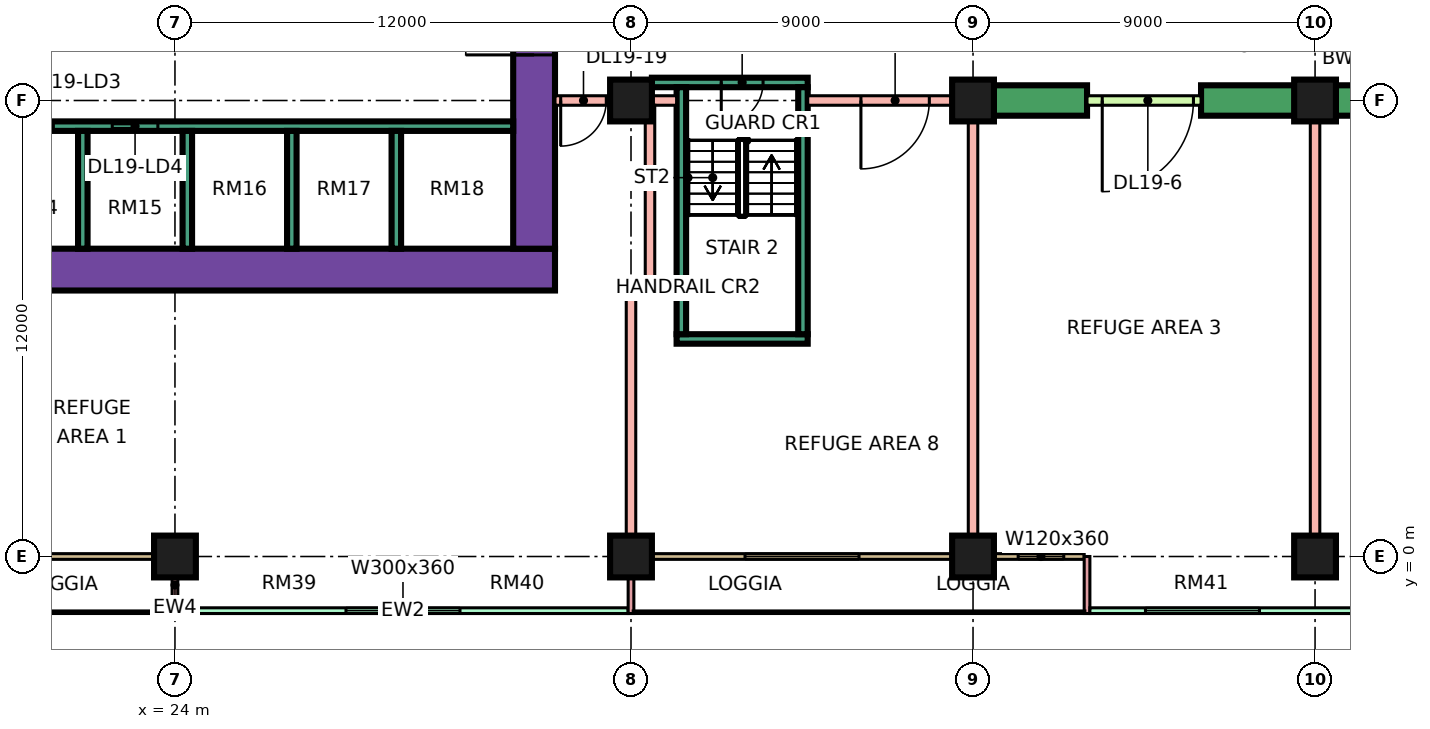
"""IFC4 building model, lengths in metres.
Left out: names, types, materials, properties, quantities, classifications, styles, units other than length and angle.
Written with IfcOpenShell. Run it as: python <this file> out.ifc"""

import sys

from ifc_helpers import new_model, si_unit, direction, frame, frame_2d, origin, origin_2d, place, context, subcontext, project, spatial, rectangle, extrude, element, fill, save


model = new_model("IFC4")
c1 = context("Model", 3, precision=1e-05, world=origin(), true_north=direction((0.0, 1.0)))
c2 = subcontext(c1, "Body", "Model", "MODEL_VIEW")
j1 = project(units=[si_unit("LENGTHUNIT", "METRE"), si_unit("PLANEANGLEUNIT", "RADIAN")], contexts=[c1])
p1 = place(None, origin())
s1 = spatial("IfcSite", under=j1, at=p1, CompositionType="ELEMENT")
p2 = place(p1, origin())
s2 = spatial("IfcBuilding", under=s1, at=p2, CompositionType="ELEMENT")
p3 = place(p2, frame((0.0, 0.0, 86.4)))
s3 = spatial("IfcBuildingStorey", under=s2, at=p3, CompositionType="ELEMENT", Elevation=86.4)
for number, where, z_axis, x_axis in (
    (1, (24.0, 0.0, 0.0), (0.0, 0.0, 1.0), (1.0, 0.0, 0.0)),
    (2, (36.0, 0.0, 0.0), (0.0, 0.0, 1.0), (1.0, 0.0, 0.0)),
    (3, (36.0, 12.0, 0.0), (0.0, 0.0, 1.0), (1.0, 0.0, 0.0)),
    (4, (45.0, 0.0, 0.0), (0.0, 0.0, 1.0), (1.0, 0.0, 0.0)),
):
    element("IfcColumn", number, at=place(p3, frame(where, z_axis=z_axis, x_axis=x_axis)), inside=s3, PredefinedType="COLUMN", context=c2, shape_type="SweptSolid", body=[
        extrude(rectangle(XDim=1.1, YDim=1.1, at=origin_2d()), origin(), (0.0, 0.0, 1.0), 5.5),
    ])
p4 = place(p3, frame((45.0, 12.0, 0.0), z_axis=(0.0, 0.0, 1.0), x_axis=(1.0, 0.0, 0.0)))
e5 = element("IfcColumn", 5, at=p4, inside=s3, PredefinedType="COLUMN", context=c2, shape_type="SweptSolid", body=[
    extrude(rectangle(XDim=1.1, YDim=1.1, at=origin_2d()), origin(), (0.0, 0.0, 1.0), 5.5),
])
p5 = place(p3, frame((54.0, 0.0, 0.0), z_axis=(0.0, 0.0, 1.0), x_axis=(1.0, 0.0, 0.0)))
e6 = element("IfcColumn", 6, at=p5, inside=s3, PredefinedType="COLUMN", context=c2, shape_type="SweptSolid", body=[
    extrude(rectangle(XDim=1.1, YDim=1.1, at=origin_2d()), origin(), (0.0, 0.0, 1.0), 5.5),
])
p6 = place(p3, frame((54.0, 12.0, 0.0), z_axis=(0.0, 0.0, 1.0), x_axis=(1.0, 0.0, 0.0)))
e7 = element("IfcColumn", 7, at=p6, inside=s3, PredefinedType="COLUMN", context=c2, shape_type="SweptSolid", body=[
    extrude(rectangle(XDim=1.1, YDim=1.1, at=origin_2d()), origin(), (0.0, 0.0, 1.0), 5.5),
])
p7 = place(p3, frame((9.0, 7.55, 0.0), z_axis=(0.0, 0.0, 1.0), x_axis=(1.0, 0.0, 0.0)))
e8 = element("IfcWall", 8, at=p7, inside=s3, PredefinedType="SHEAR", context=c2, shape_type="SweptSolid", body=[
    extrude(rectangle(XDim=25.0, YDim=1.1, at=frame_2d((12.5, 0.0))), origin(), (0.0, 0.0, 1.0), 5.5),
])
p8 = place(p3, frame((33.45, 8.1, 0.0), z_axis=(0.0, 0.0, 1.0), x_axis=(0.0, 1.0, 0.0)))
e9 = element("IfcWall", 9, at=p8, inside=s3, PredefinedType="SHEAR", context=c2, shape_type="SweptSolid", body=[
    extrude(rectangle(XDim=10.8, YDim=1.1, at=frame_2d((5.4, 0.0))), origin(), (0.0, 0.0, 1.0), 5.5),
])
p9 = place(p8, frame((5.1, 0.0, 0.0)))
e10 = element("IfcOpeningElement", 10, at=p9, cuts=e9, PredefinedType="OPENING", context=c2, shape_type="SweptSolid", body=[
    extrude(rectangle(XDim=1.8, YDim=2.4, at=frame_2d((0.9, 1.2))), frame((0.0, 0.56, 0.0), z_axis=(0.0, -1.0, 0.0), x_axis=(1.0, 0.0, 0.0)), (0.0, 0.0, 1.0), 1.12),
])
p10 = place(p3, frame((13.45, 11.325, 0.0), z_axis=(0.0, 0.0, 1.0), x_axis=(1.0, 0.0, 0.0)))
e11 = element("IfcWall", 11, at=p10, inside=s3, PredefinedType="SHEAR", context=c2, shape_type="SweptSolid", body=[
    extrude(rectangle(XDim=19.45, YDim=0.25, at=frame_2d((9.725, 0.0))), origin(), (0.0, 0.0, 1.0), 5.5),
])
p11 = place(p10, frame((0.65, 0.0, 0.0)))
e12 = element("IfcOpeningElement", 12, at=p11, cuts=e11, PredefinedType="OPENING", context=c2, shape_type="SweptSolid", body=[
    extrude(rectangle(XDim=1.2, YDim=2.2, at=frame_2d((0.6, 1.1))), frame((0.0, 0.135, 0.0), z_axis=(0.0, -1.0, 0.0), x_axis=(1.0, 0.0, 0.0)), (0.0, 0.0, 1.0), 0.27),
])
p12 = place(p10, frame((3.4, 0.0, 0.0)))
e13 = element("IfcOpeningElement", 13, at=p12, cuts=e11, PredefinedType="OPENING", context=c2, shape_type="SweptSolid", body=[
    extrude(rectangle(XDim=1.2, YDim=2.2, at=frame_2d((0.6, 1.1))), frame((0.0, 0.135, 0.0), z_axis=(0.0, -1.0, 0.0), x_axis=(1.0, 0.0, 0.0)), (0.0, 0.0, 1.0), 0.27),
])
p13 = place(p10, frame((6.15, 0.0, 0.0)))
e14 = element("IfcOpeningElement", 14, at=p13, cuts=e11, PredefinedType="OPENING", context=c2, shape_type="SweptSolid", body=[
    extrude(rectangle(XDim=1.2, YDim=2.2, at=frame_2d((0.6, 1.1))), frame((0.0, 0.135, 0.0), z_axis=(0.0, -1.0, 0.0), x_axis=(1.0, 0.0, 0.0)), (0.0, 0.0, 1.0), 0.27),
])
p14 = place(p10, frame((8.9, 0.0, 0.0)))
e15 = element("IfcOpeningElement", 15, at=p14, cuts=e11, PredefinedType="OPENING", context=c2, shape_type="SweptSolid", body=[
    extrude(rectangle(XDim=1.2, YDim=2.2, at=frame_2d((0.6, 1.1))), frame((0.0, 0.135, 0.0), z_axis=(0.0, -1.0, 0.0), x_axis=(1.0, 0.0, 0.0)), (0.0, 0.0, 1.0), 0.27),
])
for number, where, z_axis, x_axis in (
    (16, (21.575, 8.1, 0.0), (0.0, 0.0, 1.0), (0.0, 1.0, 0.0)),
    (17, (24.325, 8.1, 0.0), (0.0, 0.0, 1.0), (0.0, 1.0, 0.0)),
    (18, (27.075, 8.1, 0.0), (0.0, 0.0, 1.0), (0.0, 1.0, 0.0)),
    (19, (29.825, 8.1, 0.0), (0.0, 0.0, 1.0), (0.0, 1.0, 0.0)),
):
    element("IfcWall", number, at=place(p3, frame(where, z_axis=z_axis, x_axis=x_axis)), inside=s3, PredefinedType="SHEAR", context=c2, shape_type="SweptSolid", body=[
        extrude(rectangle(XDim=3.1, YDim=0.25, at=frame_2d((1.55, 0.0))), origin(), (0.0, 0.0, 1.0), 5.5),
    ])
p15 = place(p3, frame((37.2, 5.725, 0.0), z_axis=(0.0, 0.0, 1.0), x_axis=(1.0, 0.0, 0.0)))
e20 = element("IfcWall", 20, at=p15, inside=s3, PredefinedType="SHEAR", context=c2, shape_type="SweptSolid", body=[
    extrude(rectangle(XDim=3.45, YDim=0.25, at=frame_2d((1.725, 0.0))), origin(), (0.0, 0.0, 1.0), 5.5),
])
p16 = place(p3, frame((36.55, 12.475, 0.0), z_axis=(0.0, 0.0, 1.0), x_axis=(1.0, 0.0, 0.0)))
e21 = element("IfcWall", 21, at=p16, inside=s3, PredefinedType="SHEAR", context=c2, shape_type="SweptSolid", body=[
    extrude(rectangle(XDim=4.1, YDim=0.25, at=frame_2d((2.05, 0.0))), origin(), (0.0, 0.0, 1.0), 5.5),
])
p17 = place(p16, frame((1.825, 0.0, 0.0)))
e22 = element("IfcOpeningElement", 22, at=p17, cuts=e21, PredefinedType="OPENING", context=c2, shape_type="SweptSolid", body=[
    extrude(rectangle(XDim=1.1, YDim=2.2, at=frame_2d((0.55, 1.1))), frame((0.0, 0.135, 0.0), z_axis=(0.0, -1.0, 0.0), x_axis=(1.0, 0.0, 0.0)), (0.0, 0.0, 1.0), 0.27),
])
for number, where, z_axis, x_axis in (
    (23, (37.325, 5.85, 0.0), (0.0, 0.0, 1.0), (0.0, 1.0, 0.0)),
    (24, (40.525, 5.85, 0.0), (0.0, 0.0, 1.0), (0.0, 1.0, 0.0)),
):
    element("IfcWall", number, at=place(p3, frame(where, z_axis=z_axis, x_axis=x_axis)), inside=s3, PredefinedType="SHEAR", context=c2, shape_type="SweptSolid", body=[
        extrude(rectangle(XDim=6.5, YDim=0.25, at=frame_2d((3.25, 0.0))), origin(), (0.0, 0.0, 1.0), 5.5),
    ])
e25 = element("IfcWall", 25, at=p4, inside=s3, PredefinedType="SHEAR", context=c2, shape_type="SweptSolid", body=[
    extrude(rectangle(XDim=3.0, YDim=0.8, at=frame_2d((1.5, 0.0))), origin(), (0.0, 0.0, 1.0), 5.1),
])
p18 = place(p3, frame((51.0, 12.0, 0.0), z_axis=(0.0, 0.0, 1.0), x_axis=(1.0, 0.0, 0.0)))
e26 = element("IfcWall", 26, at=p18, inside=s3, PredefinedType="SHEAR", context=c2, shape_type="SweptSolid", body=[
    extrude(rectangle(XDim=3.0, YDim=0.8, at=frame_2d((1.5, 0.0))), origin(), (0.0, 0.0, 1.0), 5.1),
])
e27 = element("IfcWall", 27, at=p6, inside=s3, PredefinedType="SHEAR", context=c2, shape_type="SweptSolid", body=[
    extrude(rectangle(XDim=3.0, YDim=0.8, at=frame_2d((1.5, 0.0))), origin(), (0.0, 0.0, 1.0), 5.1),
])
p19 = place(p3, frame((12.575, 0.0, 0.0), z_axis=(0.0, 0.0, 1.0), x_axis=(1.0, 0.0, 0.0)))
e28 = element("IfcWall", 28, at=p19, inside=s3, PredefinedType="SOLIDWALL", context=c2, shape_type="SweptSolid", body=[
    extrude(rectangle(XDim=11.35, YDim=0.15, at=frame_2d((5.675, 0.0))), origin(), (0.0, 0.0, 1.0), 5.1),
])
p20 = place(p19, frame((3.887, 0.0, 0.45)))
e29 = element("IfcOpeningElement", 29, at=p20, cuts=e28, PredefinedType="OPENING", context=c2, shape_type="SweptSolid", body=[
    extrude(rectangle(XDim=3.0, YDim=3.6, at=frame_2d((1.5, 1.8))), frame((0.0, 0.085, 0.0), z_axis=(0.0, -1.0, 0.0), x_axis=(1.0, 0.0, 0.0)), (0.0, 0.0, 1.0), 0.17),
])
p21 = place(p3, frame((24.0, -1.5, 0.0), z_axis=(0.0, 0.0, 1.0), x_axis=(0.0, 1.0, 0.0)))
e30 = element("IfcWall", 30, at=p21, inside=s3, PredefinedType="SOLIDWALL", context=c2, shape_type="SweptSolid", body=[
    extrude(rectangle(XDim=1.5, YDim=0.15, at=frame_2d((0.75, 0.0))), origin(), (0.0, 0.0, 1.0), 5.1),
])
p22 = place(p3, frame((24.075, -1.425, 0.0), z_axis=(0.0, 0.0, 1.0), x_axis=(1.0, 0.0, 0.0)))
e31 = element("IfcWall", 31, at=p22, inside=s3, PredefinedType="SOLIDWALL", context=c2, shape_type="SweptSolid", body=[
    extrude(rectangle(XDim=11.85, YDim=0.15, at=frame_2d((5.925, 0.0))), origin(), (0.0, 0.0, 1.0), 5.1),
])
p23 = place(p22, frame((4.425, 0.0, 0.45)))
e32 = element("IfcOpeningElement", 32, at=p23, cuts=e31, PredefinedType="OPENING", context=c2, shape_type="SweptSolid", body=[
    extrude(rectangle(XDim=3.0, YDim=3.6, at=frame_2d((1.5, 1.8))), frame((0.0, 0.085, 0.0), z_axis=(0.0, -1.0, 0.0), x_axis=(1.0, 0.0, 0.0)), (0.0, 0.0, 1.0), 0.17),
])
p24 = place(p3, frame((36.075, 0.0, 0.0), z_axis=(0.0, 0.0, 1.0), x_axis=(1.0, 0.0, 0.0)))
e33 = element("IfcWall", 33, at=p24, inside=s3, PredefinedType="SOLIDWALL", context=c2, shape_type="SweptSolid", body=[
    extrude(rectangle(XDim=11.85, YDim=0.15, at=frame_2d((5.925, 0.0))), origin(), (0.0, 0.0, 1.0), 5.1),
])
p25 = place(p24, frame((2.925, 0.0, 0.45)))
e34 = element("IfcOpeningElement", 34, at=p25, cuts=e33, PredefinedType="OPENING", context=c2, shape_type="SweptSolid", body=[
    extrude(rectangle(XDim=3.0, YDim=3.6, at=frame_2d((1.5, 1.8))), frame((0.0, 0.085, 0.0), z_axis=(0.0, -1.0, 0.0), x_axis=(1.0, 0.0, 0.0)), (0.0, 0.0, 1.0), 0.17),
])
p26 = place(p24, frame((10.113, 0.0, 0.45)))
e35 = element("IfcOpeningElement", 35, at=p26, cuts=e33, PredefinedType="OPENING", context=c2, shape_type="SweptSolid", body=[
    extrude(rectangle(XDim=1.2, YDim=3.6, at=frame_2d((0.6, 1.8))), frame((0.0, 0.085, 0.0), z_axis=(0.0, -1.0, 0.0), x_axis=(1.0, 0.0, 0.0)), (0.0, 0.0, 1.0), 0.17),
])
for number, where, z_axis, x_axis in (
    (36, (36.0, -1.5, 0.0), (0.0, 0.0, 1.0), (0.0, 1.0, 0.0)),
    (37, (48.0, -1.5, 0.0), (0.0, 0.0, 1.0), (0.0, 1.0, 0.0)),
):
    element("IfcWall", number, at=place(p3, frame(where, z_axis=z_axis, x_axis=x_axis)), inside=s3, PredefinedType="SOLIDWALL", context=c2, shape_type="SweptSolid", body=[
        extrude(rectangle(XDim=1.5, YDim=0.15, at=frame_2d((0.75, 0.0))), origin(), (0.0, 0.0, 1.0), 5.1),
    ])
p27 = place(p3, frame((48.075, -1.425, 0.0), z_axis=(0.0, 0.0, 1.0), x_axis=(1.0, 0.0, 0.0)))
e38 = element("IfcWall", 38, at=p27, inside=s3, PredefinedType="SOLIDWALL", context=c2, shape_type="SweptSolid", body=[
    extrude(rectangle(XDim=11.85, YDim=0.15, at=frame_2d((5.925, 0.0))), origin(), (0.0, 0.0, 1.0), 5.1),
])
p28 = place(p27, frame((1.462, 0.0, 0.45)))
e39 = element("IfcOpeningElement", 39, at=p28, cuts=e38, PredefinedType="OPENING", context=c2, shape_type="SweptSolid", body=[
    extrude(rectangle(XDim=3.0, YDim=3.6, at=frame_2d((1.5, 1.8))), frame((0.0, 0.085, 0.0), z_axis=(0.0, -1.0, 0.0), x_axis=(1.0, 0.0, 0.0)), (0.0, 0.0, 1.0), 0.17),
])
p29 = place(p27, frame((7.387, 0.0, 0.45)))
e40 = element("IfcOpeningElement", 40, at=p29, cuts=e38, PredefinedType="OPENING", context=c2, shape_type="SweptSolid", body=[
    extrude(rectangle(XDim=3.0, YDim=3.6, at=frame_2d((1.5, 1.8))), frame((0.0, 0.085, 0.0), z_axis=(0.0, -1.0, 0.0), x_axis=(1.0, 0.0, 0.0)), (0.0, 0.0, 1.0), 0.17),
])
p30 = place(p3, frame((34.0, 12.0, 0.0), z_axis=(0.0, 0.0, 1.0), x_axis=(1.0, 0.0, 0.0)))
e41 = element("IfcWall", 41, at=p30, inside=s3, PredefinedType="PARTITIONING", context=c2, shape_type="SweptSolid", body=[
    extrude(rectangle(XDim=3.2, YDim=0.25, at=frame_2d((1.6, 0.0))), origin(), (0.0, 0.0, 1.0), 5.1),
])
p31 = place(p30, frame((0.15, 0.0, 0.0)))
e42 = element("IfcOpeningElement", 42, at=p31, cuts=e41, PredefinedType="OPENING", context=c2, shape_type="SweptSolid", body=[
    extrude(rectangle(XDim=1.2, YDim=2.1, at=frame_2d((0.6, 1.05))), frame((0.0, 0.135, 0.0), z_axis=(0.0, -1.0, 0.0), x_axis=(1.0, 0.0, 0.0)), (0.0, 0.0, 1.0), 0.27),
])
p32 = place(p3, frame((36.0, 0.0, 0.0), z_axis=(0.0, 0.0, 1.0), x_axis=(0.0, 1.0, 0.0)))
e43 = element("IfcWall", 43, at=p32, inside=s3, PredefinedType="PARTITIONING", context=c2, shape_type="SweptSolid", body=[
    extrude(rectangle(XDim=7.125, YDim=0.25, at=frame_2d((3.562, 0.0))), origin(), (0.0, 0.0, 1.0), 5.1),
])
p33 = place(p3, frame((36.125, 7.0, 0.0), z_axis=(0.0, 0.0, 1.0), x_axis=(1.0, 0.0, 0.0)))
e44 = element("IfcWall", 44, at=p33, inside=s3, PredefinedType="PARTITIONING", context=c2, shape_type="SweptSolid", body=[
    extrude(rectangle(XDim=0.25, YDim=0.25, at=frame_2d((0.125, 0.0))), origin(), (0.0, 0.0, 1.0), 5.1),
])
p34 = place(p3, frame((36.5, 6.875, 0.0), z_axis=(0.0, 0.0, 1.0), x_axis=(0.0, 1.0, 0.0)))
e45 = element("IfcWall", 45, at=p34, inside=s3, PredefinedType="PARTITIONING", context=c2, shape_type="SweptSolid", body=[
    extrude(rectangle(XDim=5.0, YDim=0.25, at=frame_2d((2.5, 0.0))), origin(), (0.0, 0.0, 1.0), 5.1),
])
p35 = place(p3, frame((40.65, 12.0, 0.0), z_axis=(0.0, 0.0, 1.0), x_axis=(1.0, 0.0, 0.0)))
e46 = element("IfcWall", 46, at=p35, inside=s3, PredefinedType="PARTITIONING", context=c2, shape_type="SweptSolid", body=[
    extrude(rectangle(XDim=4.225, YDim=0.25, at=frame_2d((2.113, 0.0))), origin(), (0.0, 0.0, 1.0), 5.1),
])
p36 = place(p35, frame((1.4, 0.0, 0.0)))
e47 = element("IfcOpeningElement", 47, at=p36, cuts=e46, PredefinedType="OPENING", context=c2, shape_type="SweptSolid", body=[
    extrude(rectangle(XDim=1.8, YDim=2.1, at=frame_2d((0.9, 1.05))), frame((0.0, 0.135, 0.0), z_axis=(0.0, -1.0, 0.0), x_axis=(1.0, 0.0, 0.0)), (0.0, 0.0, 1.0), 0.27),
])
p37 = place(p3, frame((45.0, 0.074, 0.0), z_axis=(0.0, 0.0, 1.0), x_axis=(0.0, 1.0, 0.0)))
e48 = element("IfcWall", 48, at=p37, inside=s3, PredefinedType="PARTITIONING", context=c2, shape_type="SweptSolid", body=[
    extrude(rectangle(XDim=12.051, YDim=0.25, at=frame_2d((6.025, 0.0))), origin(), (0.0, 0.0, 1.0), 5.1),
])
p38 = place(p3, frame((47.999, 12.0, 0.0), z_axis=(0.0, 0.0, 1.0), x_axis=(1.0, 0.0, 0.0)))
e49 = element("IfcWall", 49, at=p38, inside=s3, PredefinedType="PARTITIONING", context=c2, shape_type="SweptSolid", body=[
    extrude(rectangle(XDim=3.002, YDim=0.25, at=frame_2d((1.501, 0.0))), origin(), (0.0, 0.0, 1.0), 3.05),
])
p39 = place(p38, frame((0.401, 0.0, 0.0)))
e50 = element("IfcOpeningElement", 50, at=p39, cuts=e49, PredefinedType="OPENING", context=c2, shape_type="SweptSolid", body=[
    extrude(rectangle(XDim=2.4, YDim=2.1, at=frame_2d((1.2, 1.05))), frame((0.0, 0.135, 0.0), z_axis=(0.0, -1.0, 0.0), x_axis=(1.0, 0.0, 0.0)), (0.0, 0.0, 1.0), 0.27),
])
p40 = place(p3, frame((54.0, 0.0, 0.0), z_axis=(0.0, 0.0, 1.0), x_axis=(0.0, 1.0, 0.0)))
e51 = element("IfcWall", 51, at=p40, inside=s3, PredefinedType="PARTITIONING", context=c2, shape_type="SweptSolid", body=[
    extrude(rectangle(XDim=11.601, YDim=0.25, at=frame_2d((5.801, 0.0))), origin(), (0.0, 0.0, 1.0), 5.1),
])
p41 = place(p23, origin())
e52 = element("IfcWindow", 52, at=p41, inside=s3, PartitioningType="SINGLE_PANEL", PredefinedType="WINDOW", context=c2, shape_type="SweptSolid", body=[
    extrude(rectangle(XDim=3.0, YDim=3.6, at=frame_2d((1.5, 1.8))), frame((0.0, 0.03, 0.0), z_axis=(0.0, -1.0, 0.0), x_axis=(1.0, 0.0, 0.0)), (0.0, 0.0, 1.0), 0.06),
])
fill(e32, e52)
p42 = place(p25, origin())
e53 = element("IfcWindow", 53, at=p42, inside=s3, PartitioningType="SINGLE_PANEL", PredefinedType="WINDOW", context=c2, shape_type="SweptSolid", body=[
    extrude(rectangle(XDim=3.0, YDim=3.6, at=frame_2d((1.5, 1.8))), frame((0.0, 0.03, 0.0), z_axis=(0.0, -1.0, 0.0), x_axis=(1.0, 0.0, 0.0)), (0.0, 0.0, 1.0), 0.06),
])
fill(e34, e53)
p43 = place(p26, origin())
e54 = element("IfcWindow", 54, at=p43, inside=s3, PartitioningType="SINGLE_PANEL", PredefinedType="WINDOW", context=c2, shape_type="SweptSolid", body=[
    extrude(rectangle(XDim=1.2, YDim=3.6, at=frame_2d((0.6, 1.8))), frame((0.0, 0.03, 0.0), z_axis=(0.0, -1.0, 0.0), x_axis=(1.0, 0.0, 0.0)), (0.0, 0.0, 1.0), 0.06),
])
fill(e35, e54)
p44 = place(p28, origin())
e55 = element("IfcWindow", 55, at=p44, inside=s3, PartitioningType="SINGLE_PANEL", PredefinedType="WINDOW", context=c2, shape_type="SweptSolid", body=[
    extrude(rectangle(XDim=3.0, YDim=3.6, at=frame_2d((1.5, 1.8))), frame((0.0, 0.03, 0.0), z_axis=(0.0, -1.0, 0.0), x_axis=(1.0, 0.0, 0.0)), (0.0, 0.0, 1.0), 0.06),
])
fill(e39, e55)
p45 = place(p13, origin())
e56 = element("IfcDoor", 56, at=p45, inside=s3, OperationType="DOUBLE_DOOR_SLIDING", PredefinedType="DOOR", context=c2, shape_type="SweptSolid", body=[
    extrude(rectangle(XDim=1.2, YDim=2.2, at=frame_2d((0.6, 1.1))), frame((0.0, 0.025, 0.0), z_axis=(0.0, -1.0, 0.0), x_axis=(1.0, 0.0, 0.0)), (0.0, 0.0, 1.0), 0.05),
])
fill(e14, e56)
p46 = place(p14, origin())
e57 = element("IfcDoor", 57, at=p46, inside=s3, OperationType="DOUBLE_DOOR_SLIDING", PredefinedType="DOOR", context=c2, shape_type="SweptSolid", body=[
    extrude(rectangle(XDim=1.2, YDim=2.2, at=frame_2d((0.6, 1.1))), frame((0.0, 0.025, 0.0), z_axis=(0.0, -1.0, 0.0), x_axis=(1.0, 0.0, 0.0)), (0.0, 0.0, 1.0), 0.05),
])
fill(e15, e57)
p47 = place(p9, origin())
e58 = element("IfcDoor", 58, at=p47, inside=s3, OperationType="DOUBLE_DOOR_SINGLE_SWING", PredefinedType="DOOR", context=c2, shape_type="SweptSolid", body=[
    extrude(rectangle(XDim=1.8, YDim=2.4, at=frame_2d((0.9, 1.2))), frame((0.0, 0.025, 0.0), z_axis=(0.0, -1.0, 0.0), x_axis=(1.0, 0.0, 0.0)), (0.0, 0.0, 1.0), 0.05),
])
fill(e10, e58)
p48 = place(p17, frame((1.1, 0.0, 0.0), z_axis=(0.0, 0.0, 1.0), x_axis=(-1.0, 0.0, 0.0)))
e59 = element("IfcDoor", 59, at=p48, inside=s3, OperationType="SINGLE_SWING_LEFT", PredefinedType="DOOR", context=c2, shape_type="SweptSolid", body=[
    extrude(rectangle(XDim=1.1, YDim=2.2, at=frame_2d((0.55, 1.1))), frame((0.0, 0.025, 0.0), z_axis=(0.0, -1.0, 0.0), x_axis=(1.0, 0.0, 0.0)), (0.0, 0.0, 1.0), 0.05),
])
fill(e22, e59)
p49 = place(p36, frame((1.8, 0.0, 0.0), z_axis=(0.0, 0.0, 1.0), x_axis=(-1.0, 0.0, 0.0)))
e60 = element("IfcDoor", 60, at=p49, inside=s3, OperationType="DOUBLE_DOOR_SINGLE_SWING", PredefinedType="DOOR", context=c2, shape_type="SweptSolid", body=[
    extrude(rectangle(XDim=1.8, YDim=2.1, at=frame_2d((0.9, 1.05))), frame((0.0, 0.025, 0.0), z_axis=(0.0, -1.0, 0.0), x_axis=(1.0, 0.0, 0.0)), (0.0, 0.0, 1.0), 0.05),
])
fill(e47, e60)
p50 = place(p39, frame((2.4, 0.0, 0.0), z_axis=(0.0, 0.0, 1.0), x_axis=(-1.0, 0.0, 0.0)))
e61 = element("IfcDoor", 61, at=p50, inside=s3, OperationType="DOUBLE_DOOR_SINGLE_SWING", PredefinedType="DOOR", context=c2, shape_type="SweptSolid", body=[
    extrude(rectangle(XDim=2.4, YDim=2.1, at=frame_2d((1.2, 1.05))), frame((0.0, 0.025, 0.0), z_axis=(0.0, -1.0, 0.0), x_axis=(1.0, 0.0, 0.0)), (0.0, 0.0, 1.0), 0.05),
])
fill(e50, e61)
p51 = place(p31, frame((1.2, 0.0, 0.0), z_axis=(0.0, 0.0, 1.0), x_axis=(-1.0, 0.0, 0.0)))
e62 = element("IfcDoor", 62, at=p51, inside=s3, OperationType="SINGLE_SWING_LEFT", PredefinedType="DOOR", context=c2, shape_type="SweptSolid", body=[
    extrude(rectangle(XDim=1.2, YDim=2.1, at=frame_2d((0.6, 1.05))), frame((0.0, 0.025, 0.0), z_axis=(0.0, -1.0, 0.0), x_axis=(1.0, 0.0, 0.0)), (0.0, 0.0, 1.0), 0.05),
])
fill(e42, e62)
save(model, sys.argv[1])
